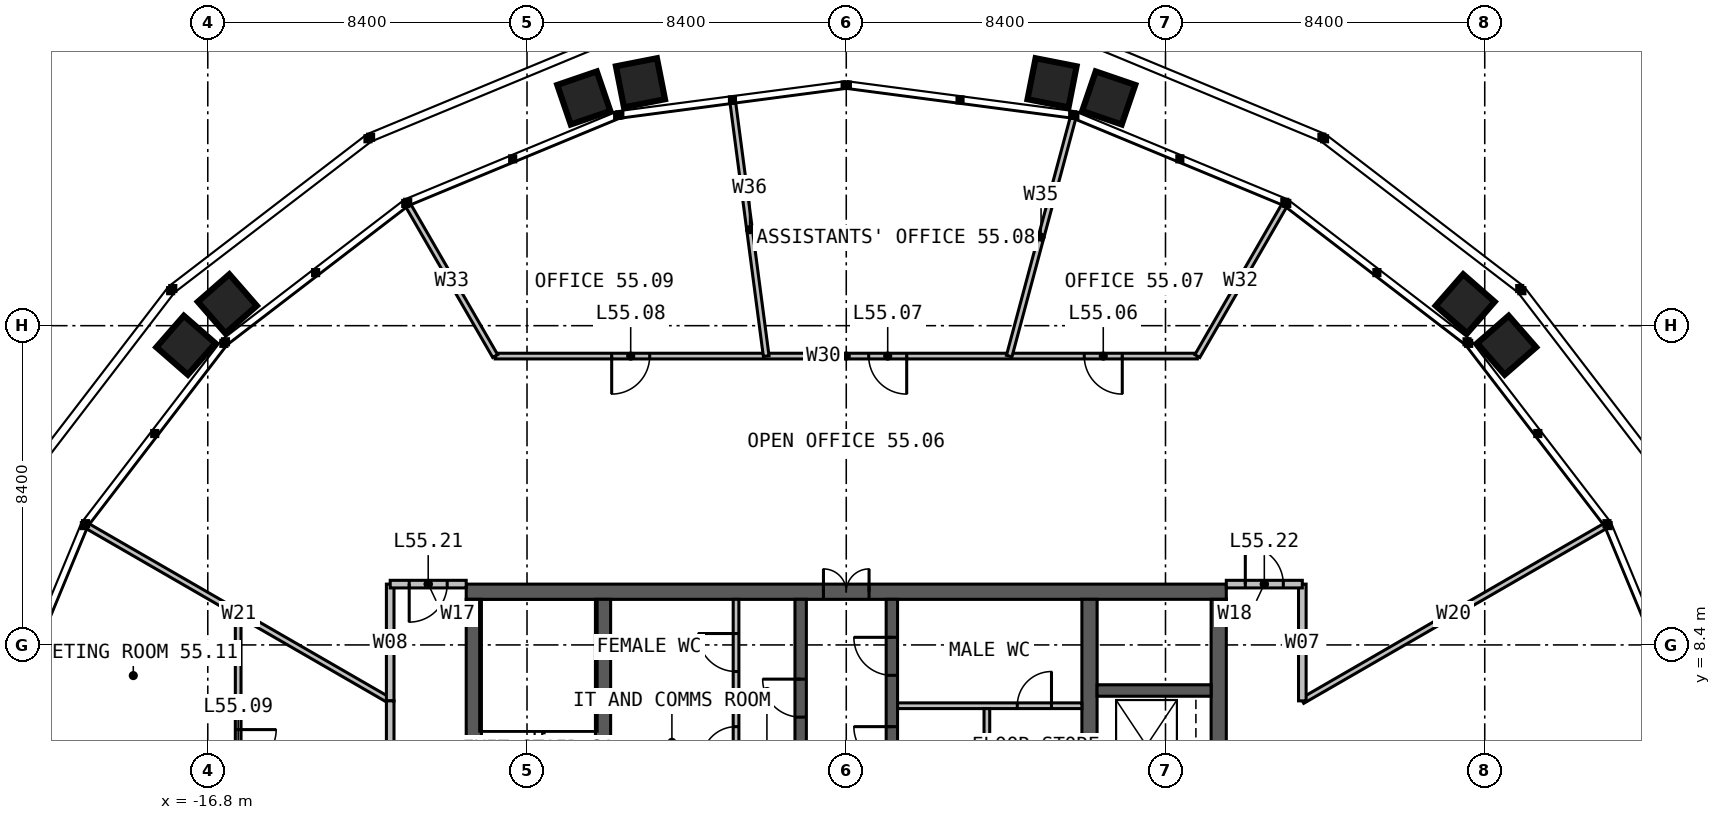
"""IFC4 building model, lengths in metres.
Left out: names, types, materials, properties, quantities, classifications, styles, units other than length and angle.
Written with IfcOpenShell. Run it as: python <this file> out.ifc"""

import sys

from ifc_helpers import new_model, si_unit, direction, frame, frame_2d, origin, place, context, subcontext, project, spatial, rectangle, extrude, element, fill, save


model = new_model("IFC4")
c1 = context("Model", 3, precision=1e-05, world=origin(), true_north=direction((0.0, 1.0)))
c2 = subcontext(c1, "Body", "Model", "MODEL_VIEW")
j1 = project(units=[si_unit("LENGTHUNIT", "METRE"), si_unit("PLANEANGLEUNIT", "RADIAN")], contexts=[c1])
p1 = place(None, origin())
s1 = spatial("IfcSite", under=j1, at=p1, CompositionType="ELEMENT")
p2 = place(p1, origin())
s2 = spatial("IfcBuilding", under=s1, at=p2, CompositionType="ELEMENT")
p3 = place(p2, frame((0.0, 0.0, 228.0)))
s3 = spatial("IfcBuildingStorey", under=s2, at=p3, CompositionType="ELEMENT", Elevation=228.0)
p4 = place(p3, frame((-10.0, 9.8, 0.0), z_axis=(0.0, 0.0, 1.0), x_axis=(1.0, 0.0, 0.0)))
e1 = element("IfcWall", 1, at=p4, inside=s3, PredefinedType="SOLIDWALL", context=c2, shape_type="SweptSolid", body=[
    extrude(rectangle(XDim=20.0, YDim=0.4, at=frame_2d((10.0, 0.0))), origin(), (0.0, 0.0, 1.0), 4.0),
])
p5 = place(p4, frame((9.4, 0.0, 0.0)))
e2 = element("IfcOpeningElement", 2, at=p5, cuts=e1, PredefinedType="OPENING", context=c2, shape_type="SweptSolid", body=[
    extrude(rectangle(XDim=1.2, YDim=2.2, at=frame_2d((0.6, 1.1))), frame((0.0, 0.21, 0.0), z_axis=(0.0, -1.0, 0.0), x_axis=(1.0, 0.0, 0.0)), (0.0, 0.0, 1.0), 0.42),
])
for number, where, z_axis, x_axis in (
    (3, (9.8, -9.6, 0.0), (0.0, 0.0, 1.0), (0.0, 1.0, 0.0)),
    (4, (-9.8, 9.6, 0.0), (0.0, 0.0, 1.0), (0.0, -1.0, 0.0)),
):
    element("IfcWall", number, at=place(p3, frame(where, z_axis=z_axis, x_axis=x_axis)), inside=s3, PredefinedType="SOLIDWALL", context=c2, shape_type="SweptSolid", body=[
        extrude(rectangle(XDim=19.2, YDim=0.4, at=frame_2d((9.6, 0.0))), origin(), (0.0, 0.0, 1.0), 4.0),
    ])
p6 = place(p3, frame((-6.4, -9.6, 0.0), z_axis=(0.0, 0.0, 1.0), x_axis=(0.0, 1.0, 0.0)))
e5 = element("IfcWall", 5, at=p6, inside=s3, PredefinedType="SOLIDWALL", context=c2, shape_type="SweptSolid", body=[
    extrude(rectangle(XDim=19.2, YDim=0.4, at=frame_2d((9.6, 0.0))), origin(), (0.0, 0.0, 1.0), 4.0),
])
p7 = place(p6, frame((9.1, 0.0, 0.0)))
e6 = element("IfcOpeningElement", 6, at=p7, cuts=e5, PredefinedType="OPENING", context=c2, shape_type="SweptSolid", body=[
    extrude(rectangle(XDim=1.0, YDim=2.2, at=frame_2d((0.5, 1.1))), frame((0.0, 0.21, 0.0), z_axis=(0.0, -1.0, 0.0), x_axis=(1.0, 0.0, 0.0)), (0.0, 0.0, 1.0), 0.42),
])
p8 = place(p3, frame((6.4, 9.6, 0.0), z_axis=(0.0, 0.0, 1.0), x_axis=(0.0, -1.0, 0.0)))
e7 = element("IfcWall", 7, at=p8, inside=s3, PredefinedType="SOLIDWALL", context=c2, shape_type="SweptSolid", body=[
    extrude(rectangle(XDim=19.2, YDim=0.4, at=frame_2d((9.6, 0.0))), origin(), (0.0, 0.0, 1.0), 4.0),
])
p9 = place(p8, frame((9.1, 0.0, 0.0)))
e8 = element("IfcOpeningElement", 8, at=p9, cuts=e7, PredefinedType="OPENING", context=c2, shape_type="SweptSolid", body=[
    extrude(rectangle(XDim=1.0, YDim=2.2, at=frame_2d((0.5, 1.1))), frame((0.0, 0.21, 0.0), z_axis=(0.0, -1.0, 0.0), x_axis=(1.0, 0.0, 0.0)), (0.0, 0.0, 1.0), 0.42),
])
p10 = place(p3, frame((-1.2, 1.45, 0.0), z_axis=(0.0, 0.0, 1.0), x_axis=(0.0, 1.0, 0.0)))
e9 = element("IfcWall", 9, at=p10, inside=s3, PredefinedType="SOLIDWALL", context=c2, shape_type="SweptSolid", body=[
    extrude(rectangle(XDim=8.15, YDim=0.3, at=frame_2d((4.075, 0.0))), origin(), (0.0, 0.0, 1.0), 4.0),
])
p11 = place(p10, frame((5.05, 0.0, 0.0)))
e10 = element("IfcOpeningElement", 10, at=p11, cuts=e9, PredefinedType="OPENING", context=c2, shape_type="SweptSolid", body=[
    extrude(rectangle(XDim=1.0, YDim=2.2, at=frame_2d((0.5, 1.1))), frame((0.0, 0.16, 0.0), z_axis=(0.0, -1.0, 0.0), x_axis=(1.0, 0.0, 0.0)), (0.0, 0.0, 1.0), 0.32),
])
p12 = place(p3, frame((1.2, 1.45, 0.0), z_axis=(0.0, 0.0, 1.0), x_axis=(0.0, 1.0, 0.0)))
e11 = element("IfcWall", 11, at=p12, inside=s3, PredefinedType="SOLIDWALL", context=c2, shape_type="SweptSolid", body=[
    extrude(rectangle(XDim=8.15, YDim=0.3, at=frame_2d((4.075, 0.0))), origin(), (0.0, 0.0, 1.0), 4.0),
])
p13 = place(p12, frame((3.8, 0.0, 0.0)))
e12 = element("IfcOpeningElement", 12, at=p13, cuts=e11, PredefinedType="OPENING", context=c2, shape_type="SweptSolid", body=[
    extrude(rectangle(XDim=1.0, YDim=2.2, at=frame_2d((0.5, 1.1))), frame((0.0, 0.16, 0.0), z_axis=(0.0, -1.0, 0.0), x_axis=(1.0, 0.0, 0.0)), (0.0, 0.0, 1.0), 0.32),
])
p14 = place(p12, frame((6.15, 0.0, 0.0)))
e13 = element("IfcOpeningElement", 13, at=p14, cuts=e11, PredefinedType="OPENING", context=c2, shape_type="SweptSolid", body=[
    extrude(rectangle(XDim=1.0, YDim=2.2, at=frame_2d((0.5, 1.1))), frame((0.0, 0.16, 0.0), z_axis=(0.0, -1.0, 0.0), x_axis=(1.0, 0.0, 0.0)), (0.0, 0.0, 1.0), 0.32),
])
p15 = place(p3, frame((6.6, 7.2, 0.0), z_axis=(0.0, 0.0, 1.0), x_axis=(1.0, 0.0, 0.0)))
e14 = element("IfcWall", 14, at=p15, inside=s3, PredefinedType="SOLIDWALL", context=c2, shape_type="SweptSolid", body=[
    extrude(rectangle(XDim=3.0, YDim=0.3, at=frame_2d((1.5, 0.0))), origin(), (0.0, 0.0, 1.0), 4.0),
])
p16 = place(p3, frame((1.35, 6.8, 0.0), z_axis=(0.0, 0.0, 1.0), x_axis=(1.0, 0.0, 0.0)))
e15 = element("IfcWall", 15, at=p16, inside=s3, PredefinedType="PARTITIONING", context=c2, shape_type="SweptSolid", body=[
    extrude(rectangle(XDim=4.85, YDim=0.15, at=frame_2d((2.425, 0.0))), origin(), (0.0, 0.0, 1.0), 3.75),
])
p17 = place(p16, frame((3.15, 0.0, 0.0)))
e16 = element("IfcOpeningElement", 16, at=p17, cuts=e15, PredefinedType="OPENING", context=c2, shape_type="SweptSolid", body=[
    extrude(rectangle(XDim=0.9, YDim=2.2, at=frame_2d((0.45, 1.1))), frame((0.0, 0.085, 0.0), z_axis=(0.0, -1.0, 0.0), x_axis=(1.0, 0.0, 0.0)), (0.0, 0.0, 1.0), 0.17),
])
p18 = place(p3, frame((3.7, 4.75, 0.0), z_axis=(0.0, 0.0, 1.0), x_axis=(0.0, 1.0, 0.0)))
e17 = element("IfcWall", 17, at=p18, inside=s3, PredefinedType="PARTITIONING", context=c2, shape_type="SweptSolid", body=[
    extrude(rectangle(XDim=1.975, YDim=0.15, at=frame_2d((0.988, 0.0))), origin(), (0.0, 0.0, 1.0), 3.75),
])
p19 = place(p3, frame((-2.9, 4.75, 0.0), z_axis=(0.0, 0.0, 1.0), x_axis=(0.0, 1.0, 0.0)))
e18 = element("IfcWall", 18, at=p19, inside=s3, PredefinedType="PARTITIONING", context=c2, shape_type="SweptSolid", body=[
    extrude(rectangle(XDim=4.85, YDim=0.15, at=frame_2d((2.425, 0.0))), origin(), (0.0, 0.0, 1.0), 3.75),
])
p20 = place(p19, frame((2.95, 0.0, 0.0)))
e19 = element("IfcOpeningElement", 19, at=p20, cuts=e18, PredefinedType="OPENING", context=c2, shape_type="SweptSolid", body=[
    extrude(rectangle(XDim=1.0, YDim=2.2, at=frame_2d((0.5, 1.1))), frame((0.0, 0.085, 0.0), z_axis=(0.0, -1.0, 0.0), x_axis=(1.0, 0.0, 0.0)), (0.0, 0.0, 1.0), 0.17),
])
p21 = place(p19, frame((0.6, 0.0, 0.0)))
e20 = element("IfcOpeningElement", 20, at=p21, cuts=e18, PredefinedType="OPENING", context=c2, shape_type="SweptSolid", body=[
    extrude(rectangle(XDim=0.9, YDim=2.2, at=frame_2d((0.45, 1.1))), frame((0.0, 0.085, 0.0), z_axis=(0.0, -1.0, 0.0), x_axis=(1.0, 0.0, 0.0)), (0.0, 0.0, 1.0), 0.17),
])
p22 = place(p3, frame((-6.2, 7.0, 0.0), z_axis=(0.0, 0.0, 1.0), x_axis=(1.0, 0.0, 0.0)))
e21 = element("IfcWall", 21, at=p22, inside=s3, PredefinedType="PARTITIONING", context=c2, shape_type="SweptSolid", body=[
    extrude(rectangle(XDim=3.225, YDim=0.15, at=frame_2d((1.612, 0.0))), origin(), (0.0, 0.0, 1.0), 3.75),
])
p23 = place(p3, frame((12.0, 3.215, 0.0), z_axis=(0.0, 0.0, 1.0), x_axis=(0.965922499828, 0.258831459304, 0.0)))
e22 = element("IfcWall", 22, at=p23, inside=s3, PredefinedType="PARTITIONING", context=c2, shape_type="SweptSolid", body=[
    extrude(rectangle(XDim=10.62, YDim=0.15, at=frame_2d((5.31, 0.0))), origin(), (0.0, 0.0, 1.0), 2.79),
])
for number, where, z_axis, x_axis in (
    (23, (12.0, 6.928, 0.0), (0.0, 0.0, 1.0), (0.866, 0.5, 0.0)),
    (24, (-12.0, 6.928, 0.0), (0.0, 0.0, 1.0), (-0.866, 0.5, 0.0)),
):
    element("IfcWall", number, at=place(p3, frame(where, z_axis=z_axis, x_axis=x_axis)), inside=s3, PredefinedType="PARTITIONING", context=c2, shape_type="SweptSolid", body=[
        extrude(rectangle(XDim=9.187, YDim=0.15, at=frame_2d((4.594, 0.0))), origin(), (0.0, 0.0, 1.0), 2.79),
    ])
p24 = place(p3, frame((12.0, 6.928, 0.0), z_axis=(0.0, 0.0, 1.0), x_axis=(0.0, 1.0, 0.0)))
e25 = element("IfcWall", 25, at=p24, inside=s3, PredefinedType="PARTITIONING", context=c2, shape_type="SweptSolid", body=[
    extrude(rectangle(XDim=3.072, YDim=0.2, at=frame_2d((1.536, 0.0))), origin(), (0.0, 0.0, 1.0), 3.8),
])
p25 = place(p3, frame((9.238, 16.0, 0.0), z_axis=(0.0, 0.0, 1.0), x_axis=(-1.0, 0.0, 0.0)))
e26 = element("IfcWall", 26, at=p25, inside=s3, PredefinedType="PARTITIONING", context=c2, shape_type="SweptSolid", body=[
    extrude(rectangle(XDim=18.475, YDim=0.15, at=frame_2d((9.238, 0.0))), origin(), (0.0, 0.0, 1.0), 2.79),
])
p26 = place(p25, frame((1.975, 0.0, 0.0)))
e27 = element("IfcOpeningElement", 27, at=p26, cuts=e26, PredefinedType="OPENING", context=c2, shape_type="SweptSolid", body=[
    extrude(rectangle(XDim=1.0, YDim=2.2, at=frame_2d((0.5, 1.1))), frame((0.0, 0.085, 0.0), z_axis=(0.0, -1.0, 0.0), x_axis=(1.0, 0.0, 0.0)), (0.0, 0.0, 1.0), 0.17),
])
p27 = place(p25, frame((7.647, 0.0, 0.0)))
e28 = element("IfcOpeningElement", 28, at=p27, cuts=e26, PredefinedType="OPENING", context=c2, shape_type="SweptSolid", body=[
    extrude(rectangle(XDim=1.0, YDim=2.2, at=frame_2d((0.5, 1.1))), frame((0.0, 0.085, 0.0), z_axis=(0.0, -1.0, 0.0), x_axis=(1.0, 0.0, 0.0)), (0.0, 0.0, 1.0), 0.17),
])
p28 = place(p25, frame((14.41, 0.0, 0.0)))
e29 = element("IfcOpeningElement", 29, at=p28, cuts=e26, PredefinedType="OPENING", context=c2, shape_type="SweptSolid", body=[
    extrude(rectangle(XDim=1.0, YDim=2.2, at=frame_2d((0.5, 1.1))), frame((0.0, 0.085, 0.0), z_axis=(0.0, -1.0, 0.0), x_axis=(1.0, 0.0, 0.0)), (0.0, 0.0, 1.0), 0.17),
])
for number, where, z_axis, x_axis in (
    (30, (9.238, 16.0, 0.0), (0.0, 0.0, 1.0), (0.5, 0.866, 0.0)),
    (31, (-9.238, 16.0, 0.0), (0.0, 0.0, 1.0), (-0.5, 0.866, 0.0)),
):
    element("IfcWall", number, at=place(p3, frame(where, z_axis=z_axis, x_axis=x_axis)), inside=s3, PredefinedType="PARTITIONING", context=c2, shape_type="SweptSolid", body=[
        extrude(rectangle(XDim=4.568, YDim=0.15, at=frame_2d((2.284, 0.0))), origin(), (0.0, 0.0, 1.0), 2.79),
    ])
p29 = place(p3, frame((4.287, 16.0, 0.0), z_axis=(0.0, 0.0, 1.0), x_axis=(0.258842191576, 0.965919623913, 0.0)))
e32 = element("IfcWall", 32, at=p29, inside=s3, PredefinedType="PARTITIONING", context=c2, shape_type="SweptSolid", body=[
    extrude(rectangle(XDim=6.479, YDim=0.15, at=frame_2d((3.239, 0.0))), origin(), (0.0, 0.0, 1.0), 2.79),
])
p30 = place(p3, frame((-2.106, 16.0, 0.0), z_axis=(0.0, 0.0, 1.0), x_axis=(-0.130513825159, 0.99144648945, 0.0)))
e33 = element("IfcWall", 33, at=p30, inside=s3, PredefinedType="PARTITIONING", context=c2, shape_type="SweptSolid", body=[
    extrude(rectangle(XDim=6.708, YDim=0.15, at=frame_2d((3.354, 0.0))), origin(), (0.0, 0.0, 1.0), 2.79),
])
p31 = place(p3, frame((-12.0, 10.0, 0.0), z_axis=(0.0, 0.0, 1.0), x_axis=(0.0, -1.0, 0.0)))
e34 = element("IfcWall", 34, at=p31, inside=s3, PredefinedType="PARTITIONING", context=c2, shape_type="SweptSolid", body=[
    extrude(rectangle(XDim=3.072, YDim=0.2, at=frame_2d((1.536, 0.0))), origin(), (0.0, 0.0, 1.0), 3.8),
])
p32 = place(p3, frame((-16.0, 9.238, 0.0), z_axis=(0.0, 0.0, 1.0), x_axis=(0.0, -1.0, 0.0)))
e35 = element("IfcWall", 35, at=p32, inside=s3, PredefinedType="PARTITIONING", context=c2, shape_type="SweptSolid", body=[
    extrude(rectangle(XDim=18.475, YDim=0.15, at=frame_2d((9.238, 0.0))), origin(), (0.0, 0.0, 1.0), 2.79),
])
p33 = place(p32, frame((3.066, 0.0, 0.0)))
e36 = element("IfcOpeningElement", 36, at=p33, cuts=e35, PredefinedType="OPENING", context=c2, shape_type="SweptSolid", body=[
    extrude(rectangle(XDim=1.0, YDim=2.2, at=frame_2d((0.5, 1.1))), frame((0.0, 0.085, 0.0), z_axis=(0.0, -1.0, 0.0), x_axis=(1.0, 0.0, 0.0)), (0.0, 0.0, 1.0), 0.17),
])
p34 = place(p32, frame((8.738, 0.0, 0.0)))
e37 = element("IfcOpeningElement", 37, at=p34, cuts=e35, PredefinedType="OPENING", context=c2, shape_type="SweptSolid", body=[
    extrude(rectangle(XDim=1.0, YDim=2.2, at=frame_2d((0.5, 1.1))), frame((0.0, 0.085, 0.0), z_axis=(0.0, -1.0, 0.0), x_axis=(1.0, 0.0, 0.0)), (0.0, 0.0, 1.0), 0.17),
])
p35 = place(p32, frame((14.41, 0.0, 0.0)))
e38 = element("IfcOpeningElement", 38, at=p35, cuts=e35, PredefinedType="OPENING", context=c2, shape_type="SweptSolid", body=[
    extrude(rectangle(XDim=1.0, YDim=2.2, at=frame_2d((0.5, 1.1))), frame((0.0, 0.085, 0.0), z_axis=(0.0, -1.0, 0.0), x_axis=(1.0, 0.0, 0.0)), (0.0, 0.0, 1.0), 0.17),
])
p36 = place(p3, frame((-12.0, 6.928, 0.0), z_axis=(0.0, 0.0, 1.0), x_axis=(0.0, -1.0, 0.0)))
e39 = element("IfcWall", 39, at=p36, inside=s3, PredefinedType="PARTITIONING", context=c2, shape_type="SweptSolid", body=[
    extrude(rectangle(XDim=13.856, YDim=0.2, at=frame_2d((6.928, 0.0))), origin(), (0.0, 0.0, 1.0), 3.8),
])
p37 = place(p36, frame((6.028, 0.0, 0.0)))
e40 = element("IfcOpeningElement", 40, at=p37, cuts=e39, PredefinedType="OPENING", context=c2, shape_type="SweptSolid", body=[
    extrude(rectangle(XDim=1.8, YDim=2.2, at=frame_2d((0.9, 1.1))), frame((0.0, 0.11, 0.0), z_axis=(0.0, -1.0, 0.0), x_axis=(1.0, 0.0, 0.0)), (0.0, 0.0, 1.0), 0.22),
])
p38 = place(p3, frame((-10.0, 10.0, 0.0), z_axis=(0.0, 0.0, 1.0), x_axis=(-1.0, 0.0, 0.0)))
e41 = element("IfcWall", 41, at=p38, inside=s3, PredefinedType="PARTITIONING", context=c2, shape_type="SweptSolid", body=[
    extrude(rectangle(XDim=2.0, YDim=0.2, at=frame_2d((1.0, 0.0))), origin(), (0.0, 0.0, 1.0), 3.8),
])
p39 = place(p38, frame((0.5, 0.0, 0.0)))
e42 = element("IfcOpeningElement", 42, at=p39, cuts=e41, PredefinedType="OPENING", context=c2, shape_type="SweptSolid", body=[
    extrude(rectangle(XDim=1.0, YDim=2.2, at=frame_2d((0.5, 1.1))), frame((0.0, 0.11, 0.0), z_axis=(0.0, -1.0, 0.0), x_axis=(1.0, 0.0, 0.0)), (0.0, 0.0, 1.0), 0.22),
])
p40 = place(p3, frame((10.0, 10.0, 0.0), z_axis=(0.0, 0.0, 1.0), x_axis=(1.0, 0.0, 0.0)))
e43 = element("IfcWall", 43, at=p40, inside=s3, PredefinedType="PARTITIONING", context=c2, shape_type="SweptSolid", body=[
    extrude(rectangle(XDim=2.0, YDim=0.2, at=frame_2d((1.0, 0.0))), origin(), (0.0, 0.0, 1.0), 3.8),
])
p41 = place(p40, frame((0.5, 0.0, 0.0)))
e44 = element("IfcOpeningElement", 44, at=p41, cuts=e43, PredefinedType="OPENING", context=c2, shape_type="SweptSolid", body=[
    extrude(rectangle(XDim=1.0, YDim=2.2, at=frame_2d((0.5, 1.1))), frame((0.0, 0.11, 0.0), z_axis=(0.0, -1.0, 0.0), x_axis=(1.0, 0.0, 0.0)), (0.0, 0.0, 1.0), 0.22),
])
p42 = place(p5, origin())
e45 = element("IfcDoor", 45, at=p42, inside=s3, OperationType="DOUBLE_DOOR_SINGLE_SWING", PredefinedType="DOOR", context=c2, shape_type="SweptSolid", body=[
    extrude(rectangle(XDim=1.2, YDim=2.2, at=frame_2d((0.6, 1.1))), frame((0.0, 0.025, 0.0), z_axis=(0.0, -1.0, 0.0), x_axis=(1.0, 0.0, 0.0)), (0.0, 0.0, 1.0), 0.05),
])
fill(e2, e45)
p43 = place(p11, origin())
e46 = element("IfcDoor", 46, at=p43, inside=s3, OperationType="SINGLE_SWING_RIGHT", PredefinedType="DOOR", context=c2, shape_type="SweptSolid", body=[
    extrude(rectangle(XDim=1.0, YDim=2.2, at=frame_2d((0.5, 1.1))), frame((0.0, 0.025, 0.0), z_axis=(0.0, -1.0, 0.0), x_axis=(1.0, 0.0, 0.0)), (0.0, 0.0, 1.0), 0.05),
])
fill(e10, e46)
p44 = place(p13, origin())
e47 = element("IfcDoor", 47, at=p44, inside=s3, OperationType="SINGLE_SWING_RIGHT", PredefinedType="DOOR", context=c2, shape_type="SweptSolid", body=[
    extrude(rectangle(XDim=1.0, YDim=2.2, at=frame_2d((0.5, 1.1))), frame((0.0, 0.025, 0.0), z_axis=(0.0, -1.0, 0.0), x_axis=(1.0, 0.0, 0.0)), (0.0, 0.0, 1.0), 0.05),
])
fill(e12, e47)
p45 = place(p14, origin())
e48 = element("IfcDoor", 48, at=p45, inside=s3, OperationType="SINGLE_SWING_RIGHT", PredefinedType="DOOR", context=c2, shape_type="SweptSolid", body=[
    extrude(rectangle(XDim=1.0, YDim=2.2, at=frame_2d((0.5, 1.1))), frame((0.0, 0.025, 0.0), z_axis=(0.0, -1.0, 0.0), x_axis=(1.0, 0.0, 0.0)), (0.0, 0.0, 1.0), 0.05),
])
fill(e13, e48)
p46 = place(p17, origin())
e49 = element("IfcDoor", 49, at=p46, inside=s3, OperationType="SINGLE_SWING_RIGHT", PredefinedType="DOOR", context=c2, shape_type="SweptSolid", body=[
    extrude(rectangle(XDim=0.9, YDim=2.2, at=frame_2d((0.45, 1.1))), frame((0.0, 0.025, 0.0), z_axis=(0.0, -1.0, 0.0), x_axis=(1.0, 0.0, 0.0)), (0.0, 0.0, 1.0), 0.05),
])
fill(e16, e49)
p47 = place(p20, origin())
e50 = element("IfcDoor", 50, at=p47, inside=s3, OperationType="SINGLE_SWING_RIGHT", PredefinedType="DOOR", context=c2, shape_type="SweptSolid", body=[
    extrude(rectangle(XDim=1.0, YDim=2.2, at=frame_2d((0.5, 1.1))), frame((0.0, 0.025, 0.0), z_axis=(0.0, -1.0, 0.0), x_axis=(1.0, 0.0, 0.0)), (0.0, 0.0, 1.0), 0.05),
])
fill(e19, e50)
p48 = place(p21, origin())
e51 = element("IfcDoor", 51, at=p48, inside=s3, OperationType="SINGLE_SWING_LEFT", PredefinedType="DOOR", context=c2, shape_type="SweptSolid", body=[
    extrude(rectangle(XDim=0.9, YDim=2.2, at=frame_2d((0.45, 1.1))), frame((0.0, 0.025, 0.0), z_axis=(0.0, -1.0, 0.0), x_axis=(1.0, 0.0, 0.0)), (0.0, 0.0, 1.0), 0.05),
])
fill(e20, e51)
p49 = place(p26, origin())
e52 = element("IfcDoor", 52, at=p49, inside=s3, OperationType="SINGLE_SWING_LEFT", PredefinedType="DOOR", context=c2, shape_type="SweptSolid", body=[
    extrude(rectangle(XDim=1.0, YDim=2.2, at=frame_2d((0.5, 1.1))), frame((0.0, 0.025, 0.0), z_axis=(0.0, -1.0, 0.0), x_axis=(1.0, 0.0, 0.0)), (0.0, 0.0, 1.0), 0.05),
])
fill(e27, e52)
p50 = place(p27, origin())
e53 = element("IfcDoor", 53, at=p50, inside=s3, OperationType="SINGLE_SWING_LEFT", PredefinedType="DOOR", context=c2, shape_type="SweptSolid", body=[
    extrude(rectangle(XDim=1.0, YDim=2.2, at=frame_2d((0.5, 1.1))), frame((0.0, 0.025, 0.0), z_axis=(0.0, -1.0, 0.0), x_axis=(1.0, 0.0, 0.0)), (0.0, 0.0, 1.0), 0.05),
])
fill(e28, e53)
p51 = place(p28, origin())
e54 = element("IfcDoor", 54, at=p51, inside=s3, OperationType="SINGLE_SWING_RIGHT", PredefinedType="DOOR", context=c2, shape_type="SweptSolid", body=[
    extrude(rectangle(XDim=1.0, YDim=2.2, at=frame_2d((0.5, 1.1))), frame((0.0, 0.025, 0.0), z_axis=(0.0, -1.0, 0.0), x_axis=(1.0, 0.0, 0.0)), (0.0, 0.0, 1.0), 0.05),
])
fill(e29, e54)
p52 = place(p33, origin())
e55 = element("IfcDoor", 55, at=p52, inside=s3, OperationType="SINGLE_SWING_LEFT", PredefinedType="DOOR", context=c2, shape_type="SweptSolid", body=[
    extrude(rectangle(XDim=1.0, YDim=2.2, at=frame_2d((0.5, 1.1))), frame((0.0, 0.025, 0.0), z_axis=(0.0, -1.0, 0.0), x_axis=(1.0, 0.0, 0.0)), (0.0, 0.0, 1.0), 0.05),
])
fill(e36, e55)
p53 = place(p39, origin())
e56 = element("IfcDoor", 56, at=p53, inside=s3, OperationType="SINGLE_SWING_RIGHT", PredefinedType="DOOR", context=c2, shape_type="SweptSolid", body=[
    extrude(rectangle(XDim=1.0, YDim=2.2, at=frame_2d((0.5, 1.1))), frame((0.0, 0.025, 0.0), z_axis=(0.0, -1.0, 0.0), x_axis=(1.0, 0.0, 0.0)), (0.0, 0.0, 1.0), 0.05),
])
fill(e42, e56)
p54 = place(p41, origin())
e57 = element("IfcDoor", 57, at=p54, inside=s3, OperationType="SINGLE_SWING_LEFT", PredefinedType="DOOR", context=c2, shape_type="SweptSolid", body=[
    extrude(rectangle(XDim=1.0, YDim=2.2, at=frame_2d((0.5, 1.1))), frame((0.0, 0.025, 0.0), z_axis=(0.0, -1.0, 0.0), x_axis=(1.0, 0.0, 0.0)), (0.0, 0.0, 1.0), 0.05),
])
fill(e44, e57)
save(model, sys.argv[1])
